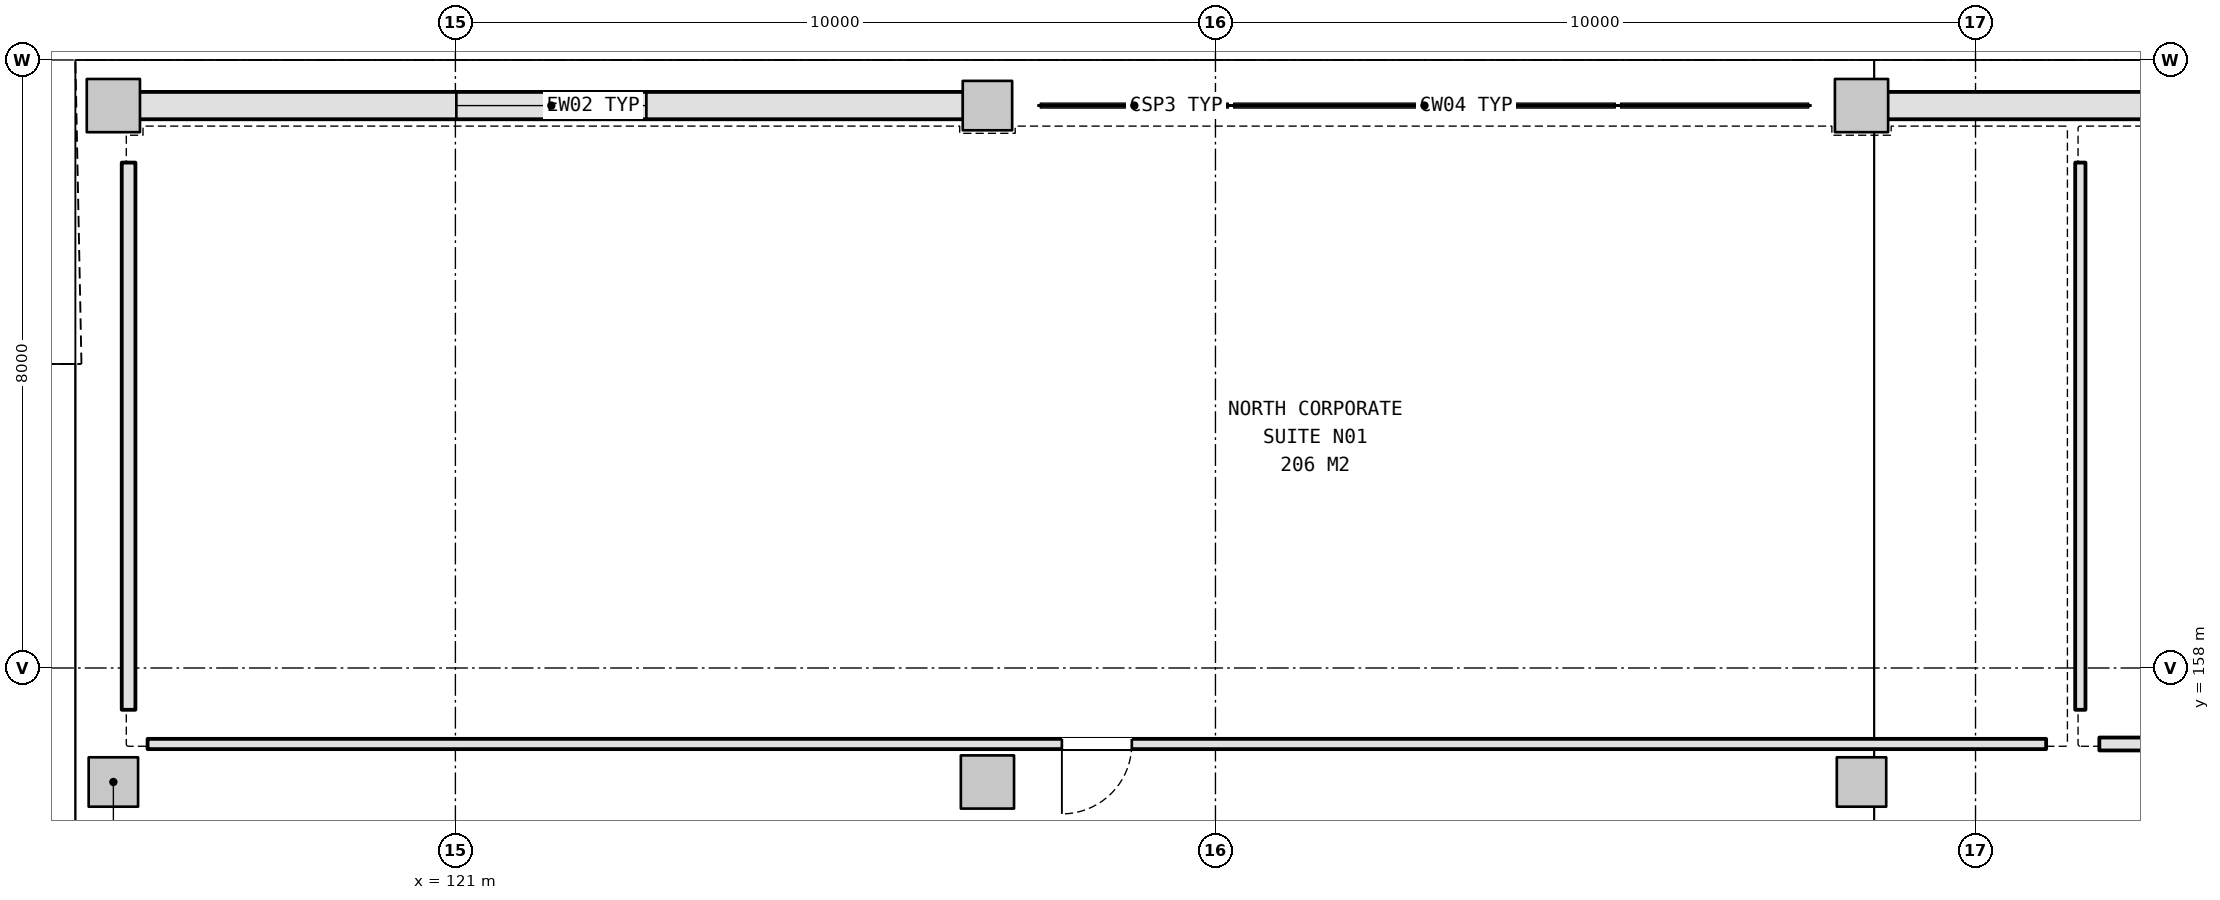
"""IFC4 building model, lengths in metres.
Left out: names, types, materials, properties, quantities, classifications, styles, units other than length and angle.
Written with IfcOpenShell. Run it as: python <this file> out.ifc"""

import sys

from ifc_helpers import new_model, si_unit, direction, frame, frame_2d, origin, origin_2d, place, context, subcontext, project, spatial, rectangle, extrude, element, fill, save


model = new_model("IFC4")
c1 = context("Model", 3, precision=1e-05, world=origin(), true_north=direction((0.0, 1.0)))
c2 = subcontext(c1, "Body", "Model", "MODEL_VIEW")
j1 = project(units=[si_unit("LENGTHUNIT", "METRE"), si_unit("PLANEANGLEUNIT", "RADIAN")], contexts=[c1])
p1 = place(None, origin())
s1 = spatial("IfcSite", under=j1, at=p1, CompositionType="ELEMENT")
p2 = place(p1, origin())
s2 = spatial("IfcBuilding", under=s1, at=p2, CompositionType="ELEMENT")
p3 = place(p2, frame((0.0, 0.0, 10.8)))
s3 = spatial("IfcBuildingStorey", under=s2, at=p3, CompositionType="ELEMENT", Elevation=10.8)
p4 = place(p3, frame((116.5, 156.5, 0.0), z_axis=(0.0, 0.0, 1.0), x_axis=(1.0, 0.0, 0.0)))
e1 = element("IfcColumn", 1, at=p4, inside=s3, PredefinedType="COLUMN", context=c2, shape_type="SweptSolid", body=[
    extrude(rectangle(XDim=0.65, YDim=0.65, at=origin_2d()), origin(), (0.0, 0.0, 1.0), 5.4),
])
for number, where, z_axis, x_axis in (
    (2, (116.5, 165.4, 0.0), (0.0, 0.0, 1.0), (1.0, 0.0, 0.0)),
    (3, (128.0, 156.5, 0.0), (0.0, 0.0, 1.0), (1.0, 0.0, 0.0)),
):
    element("IfcColumn", number, at=place(p3, frame(where, z_axis=z_axis, x_axis=x_axis)), inside=s3, PredefinedType="COLUMN", context=c2, shape_type="SweptSolid", body=[
        extrude(rectangle(XDim=0.7, YDim=0.7, at=origin_2d()), origin(), (0.0, 0.0, 1.0), 5.4),
    ])
for number, where, z_axis, x_axis in (
    (4, (128.0, 165.4, 0.0), (0.0, 0.0, 1.0), (1.0, 0.0, 0.0)),
    (5, (139.5, 156.5, 0.0), (0.0, 0.0, 1.0), (1.0, 0.0, 0.0)),
):
    element("IfcColumn", number, at=place(p3, frame(where, z_axis=z_axis, x_axis=x_axis)), inside=s3, PredefinedType="COLUMN", context=c2, shape_type="SweptSolid", body=[
        extrude(rectangle(XDim=0.65, YDim=0.65, at=origin_2d()), origin(), (0.0, 0.0, 1.0), 5.4),
    ])
p5 = place(p3, frame((139.5, 165.4, 0.0), z_axis=(0.0, 0.0, 1.0), x_axis=(1.0, 0.0, 0.0)))
e6 = element("IfcColumn", 6, at=p5, inside=s3, PredefinedType="COLUMN", context=c2, shape_type="SweptSolid", body=[
    extrude(rectangle(XDim=0.7, YDim=0.7, at=origin_2d()), origin(), (0.0, 0.0, 1.0), 5.4),
])
p6 = place(p3, frame((116.838, 165.4, 0.0), z_axis=(0.0, 0.0, 1.0), x_axis=(1.0, 0.0, 0.0)))
e7 = element("IfcWall", 7, at=p6, inside=s3, PredefinedType="SOLIDWALL", context=c2, shape_type="SweptSolid", body=[
    extrude(rectangle(XDim=10.849, YDim=0.36, at=frame_2d((5.425, 0.0))), origin(), (0.0, 0.0, 1.0), 4.455),
])
p7 = place(p6, frame((4.175, 0.0, 1.05)))
e8 = element("IfcOpeningElement", 8, at=p7, cuts=e7, PredefinedType="OPENING", context=c2, shape_type="SweptSolid", body=[
    extrude(rectangle(XDim=2.5, YDim=2.0, at=frame_2d((1.25, 1.0))), frame((0.0, 0.19, 0.0), z_axis=(0.0, -1.0, 0.0), x_axis=(1.0, 0.0, 0.0)), (0.0, 0.0, 1.0), 0.38),
])
p8 = place(p3, frame((139.838, 165.4, 0.0), z_axis=(0.0, 0.0, 1.0), x_axis=(1.0, 0.0, 0.0)))
e9 = element("IfcWall", 9, at=p8, inside=s3, PredefinedType="SOLIDWALL", context=c2, shape_type="SweptSolid", body=[
    extrude(rectangle(XDim=10.849, YDim=0.36, at=frame_2d((5.425, 0.0))), origin(), (0.0, 0.0, 1.0), 4.455),
])
p9 = place(p8, frame((4.175, 0.0, 1.05)))
e10 = element("IfcOpeningElement", 10, at=p9, cuts=e9, PredefinedType="OPENING", context=c2, shape_type="SweptSolid", body=[
    extrude(rectangle(XDim=2.5, YDim=2.0, at=frame_2d((1.25, 1.0))), frame((0.0, 0.19, 0.0), z_axis=(0.0, -1.0, 0.0), x_axis=(1.0, 0.0, 0.0)), (0.0, 0.0, 1.0), 0.38),
])
p10 = place(p3, frame((141.929, 157.0, 0.0), z_axis=(0.0, 0.0, 1.0), x_axis=(-1.0, 0.0, 0.0)))
e11 = element("IfcWall", 11, at=p10, inside=s3, PredefinedType="PARTITIONING", context=c2, shape_type="SweptSolid", body=[
    extrude(rectangle(XDim=24.979, YDim=0.135, at=frame_2d((12.49, 0.0))), origin(), (0.0, 0.0, 1.0), 4.505),
])
p11 = place(p10, frame((12.03, 0.0, 0.0)))
e12 = element("IfcOpeningElement", 12, at=p11, cuts=e11, PredefinedType="OPENING", context=c2, shape_type="SweptSolid", body=[
    extrude(rectangle(XDim=0.92, YDim=2.1, at=frame_2d((0.46, 1.05))), frame((0.0, 0.077, 0.0), z_axis=(0.0, -1.0, 0.0), x_axis=(1.0, 0.0, 0.0)), (0.0, 0.0, 1.0), 0.155),
])
p12 = place(p3, frame((116.7, 157.45, 0.0), z_axis=(0.0, 0.0, 1.0), x_axis=(0.0, 1.0, 0.0)))
e13 = element("IfcWall", 13, at=p12, inside=s3, PredefinedType="PARTITIONING", context=c2, shape_type="SweptSolid", body=[
    extrude(rectangle(XDim=7.2, YDim=0.18, at=frame_2d((3.6, 0.0))), origin(), (0.0, 0.0, 1.0), 4.455),
])
p13 = place(p3, frame((167.608, 157.0, 0.0), z_axis=(0.0, 0.0, 1.0), x_axis=(-1.0, 0.0, 0.0)))
e14 = element("IfcWall", 14, at=p13, inside=s3, PredefinedType="PARTITIONING", context=c2, shape_type="SweptSolid", body=[
    extrude(rectangle(XDim=24.979, YDim=0.17, at=frame_2d((12.49, 0.0))), origin(), (0.0, 0.0, 1.0), 4.505),
])
p14 = place(p13, frame((11.689, 0.0, 0.0)))
e15 = element("IfcOpeningElement", 15, at=p14, cuts=e14, PredefinedType="OPENING", context=c2, shape_type="SweptSolid", body=[
    extrude(rectangle(XDim=1.6, YDim=2.2, at=frame_2d((0.8, 1.1))), frame((0.0, 0.095, 0.0), z_axis=(0.0, -1.0, 0.0), x_axis=(1.0, 0.0, 0.0)), (0.0, 0.0, 1.0), 0.19),
])
p15 = place(p3, frame((142.379, 157.45, 0.0), z_axis=(0.0, 0.0, 1.0), x_axis=(0.0, 1.0, 0.0)))
e16 = element("IfcWall", 16, at=p15, inside=s3, PredefinedType="PARTITIONING", context=c2, shape_type="SweptSolid", body=[
    extrude(rectangle(XDim=7.2, YDim=0.135, at=frame_2d((3.6, 0.0))), origin(), (0.0, 0.0, 1.0), 4.655),
])
p16 = place(p7, origin())
e17 = element("IfcWindow", 17, at=p16, inside=s3, PartitioningType="SINGLE_PANEL", PredefinedType="WINDOW", context=c2, shape_type="SweptSolid", body=[
    extrude(rectangle(XDim=2.5, YDim=2.0, at=frame_2d((1.25, 1.0))), frame((0.0, 0.03, 0.0), z_axis=(0.0, -1.0, 0.0), x_axis=(1.0, 0.0, 0.0)), (0.0, 0.0, 1.0), 0.06),
])
fill(e8, e17)
p17 = place(p11, origin())
e18 = element("IfcDoor", 18, at=p17, inside=s3, OperationType="SINGLE_SWING_RIGHT", PredefinedType="DOOR", context=c2, shape_type="SweptSolid", body=[
    extrude(rectangle(XDim=0.92, YDim=2.1, at=frame_2d((0.46, 1.05))), frame((0.0, 0.025, 0.0), z_axis=(0.0, -1.0, 0.0), x_axis=(1.0, 0.0, 0.0)), (0.0, 0.0, 1.0), 0.05),
])
fill(e12, e18)
save(model, sys.argv[1])
